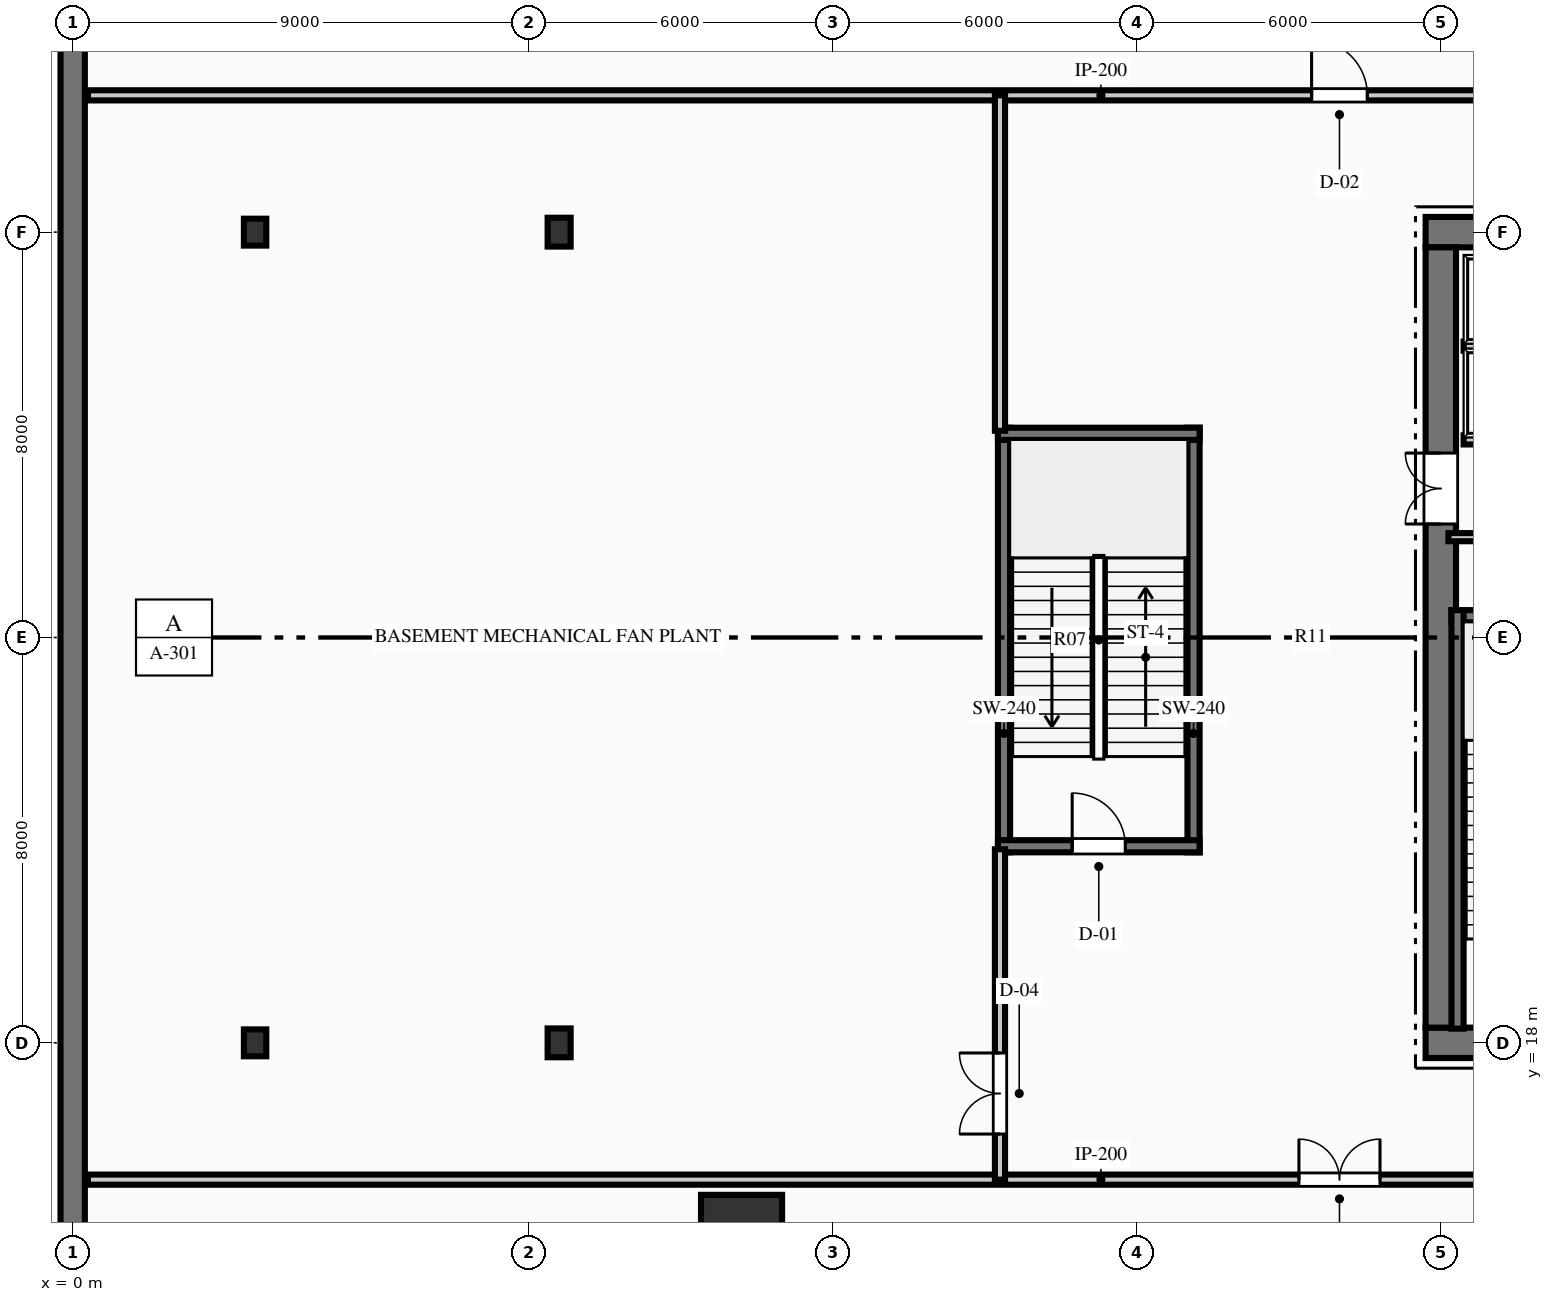
"""IFC4 building model, lengths in metres.
Left out: names, types, materials, properties, quantities, classifications, styles, units other than length and angle.
Written with IfcOpenShell. Run it as: python <this file> out.ifc"""

import sys

from ifc_helpers import new_model, si_unit, direction, frame, frame_2d, origin, origin_2d, place, context, subcontext, project, spatial, rectangle, hollow_rectangle, i_section, extrude, element, fill, save


model = new_model("IFC4")
c1 = context("Model", 3, precision=1e-05, world=origin(), true_north=direction((0.0, 1.0)))
c2 = subcontext(c1, "Body", "Model", "MODEL_VIEW")
j1 = project(units=[si_unit("LENGTHUNIT", "METRE"), si_unit("PLANEANGLEUNIT", "RADIAN")], contexts=[c1])
p1 = place(None, origin())
s1 = spatial("IfcSite", under=j1, at=p1, CompositionType="ELEMENT")
p2 = place(p1, origin())
s2 = spatial("IfcBuilding", under=s1, at=p2, CompositionType="ELEMENT")
p3 = place(p2, frame((0.0, 0.0, -5.2)))
s3 = spatial("IfcBuildingStorey", under=s2, at=p3, CompositionType="ELEMENT", Elevation=-5.2)
p4 = place(p3, frame((26.7, 18.0, -0.3), z_axis=(0.0, 0.0, 1.0), x_axis=(1.0, 0.0, 0.0)))
e1 = element("IfcWall", 1, at=p4, inside=s3, PredefinedType="SHEAR", context=c2, shape_type="SweptSolid", body=[
    extrude(rectangle(XDim=18.6, YDim=0.6, at=frame_2d((9.3, 0.0))), origin(), (0.0, 0.0, 1.0), 5.5),
])
p5 = place(p4, frame((7.4, 0.0, 0.3)))
e2 = element("IfcOpeningElement", 2, at=p5, cuts=e1, PredefinedType="OPENING", context=c2, shape_type="SweptSolid", body=[
    extrude(rectangle(XDim=1.1, YDim=2.15, at=frame_2d((0.55, 1.075))), frame((0.0, 0.31, 0.0), z_axis=(0.0, -1.0, 0.0), x_axis=(1.0, 0.0, 0.0)), (0.0, 0.0, 1.0), 0.62),
])
p6 = place(p4, frame((10.1, 0.0, 0.3)))
e3 = element("IfcOpeningElement", 3, at=p6, cuts=e1, PredefinedType="OPENING", context=c2, shape_type="SweptSolid", body=[
    extrude(rectangle(XDim=1.1, YDim=2.15, at=frame_2d((0.55, 1.075))), frame((0.0, 0.31, 0.0), z_axis=(0.0, -1.0, 0.0), x_axis=(1.0, 0.0, 0.0)), (0.0, 0.0, 1.0), 0.62),
])
p7 = place(p3, frame((26.7, 34.0, -0.3), z_axis=(0.0, 0.0, 1.0), x_axis=(1.0, 0.0, 0.0)))
e4 = element("IfcWall", 4, at=p7, inside=s3, PredefinedType="SHEAR", context=c2, shape_type="SweptSolid", body=[
    extrude(rectangle(XDim=18.6, YDim=0.6, at=frame_2d((9.3, 0.0))), origin(), (0.0, 0.0, 1.0), 5.5),
])
p8 = place(p7, frame((1.265, 0.0, 0.3)))
e5 = element("IfcOpeningElement", 5, at=p8, cuts=e4, PredefinedType="OPENING", context=c2, shape_type="SweptSolid", body=[
    extrude(rectangle(XDim=1.1, YDim=2.15, at=frame_2d((0.55, 1.075))), frame((0.0, 0.31, 0.0), z_axis=(0.0, -1.0, 0.0), x_axis=(1.0, 0.0, 0.0)), (0.0, 0.0, 1.0), 0.62),
])
p9 = place(p7, frame((3.515, 0.0, 0.3)))
e6 = element("IfcOpeningElement", 6, at=p9, cuts=e4, PredefinedType="OPENING", context=c2, shape_type="SweptSolid", body=[
    extrude(rectangle(XDim=1.1, YDim=2.15, at=frame_2d((0.55, 1.075))), frame((0.0, 0.31, 0.0), z_axis=(0.0, -1.0, 0.0), x_axis=(1.0, 0.0, 0.0)), (0.0, 0.0, 1.0), 0.62),
])
p10 = place(p3, frame((27.0, 18.3, -0.3), z_axis=(0.0, 0.0, 1.0), x_axis=(0.0, 1.0, 0.0)))
e7 = element("IfcWall", 7, at=p10, inside=s3, PredefinedType="SHEAR", context=c2, shape_type="SweptSolid", body=[
    extrude(rectangle(XDim=15.4, YDim=0.6, at=frame_2d((7.7, 0.0))), origin(), (0.0, 0.0, 1.0), 5.5),
])
p11 = place(p10, frame((9.94, 0.0, 0.3)))
e8 = element("IfcOpeningElement", 8, at=p11, cuts=e7, PredefinedType="OPENING", context=c2, shape_type="SweptSolid", body=[
    extrude(rectangle(XDim=1.4, YDim=2.2, at=frame_2d((0.7, 1.1))), frame((0.0, 0.31, 0.0), z_axis=(0.0, -1.0, 0.0), x_axis=(1.0, 0.0, 0.0)), (0.0, 0.0, 1.0), 0.62),
])
p12 = place(p3, frame((27.21, 26.42, -0.3), z_axis=(0.0, 0.0, 1.0), x_axis=(1.0, 0.0, 0.0)))
e9 = element("IfcWall", 9, at=p12, inside=s3, PredefinedType="SHEAR", context=c2, shape_type="SweptSolid", body=[
    extrude(rectangle(XDim=3.98, YDim=0.24, at=frame_2d((1.99, 0.0))), origin(), (0.0, 0.0, 1.0), 5.5),
])
p13 = place(p3, frame((27.33, 18.28, -0.3), z_axis=(0.0, 0.0, 1.0), x_axis=(0.0, 1.0, 0.0)))
e10 = element("IfcWall", 10, at=p13, inside=s3, PredefinedType="SHEAR", context=c2, shape_type="SweptSolid", body=[
    extrude(rectangle(XDim=8.26, YDim=0.24, at=frame_2d((4.13, 0.0))), origin(), (0.0, 0.0, 1.0), 5.5),
])
for number, where, z_axis, x_axis in (
    (11, (18.38, 21.76, -0.3), (0.0, 0.0, 1.0), (0.0, 1.0, 0.0)),
    (12, (22.12, 21.76, -0.3), (0.0, 0.0, 1.0), (0.0, 1.0, 0.0)),
):
    element("IfcWall", number, at=place(p3, frame(where, z_axis=z_axis, x_axis=x_axis)), inside=s3, PredefinedType="SHEAR", context=c2, shape_type="SweptSolid", body=[
        extrude(rectangle(XDim=8.38, YDim=0.24, at=frame_2d((4.19, 0.0))), origin(), (0.0, 0.0, 1.0), 5.5),
    ])
p14 = place(p3, frame((18.26, 21.88, -0.3), z_axis=(0.0, 0.0, 1.0), x_axis=(1.0, 0.0, 0.0)))
e13 = element("IfcWall", 13, at=p14, inside=s3, PredefinedType="SHEAR", context=c2, shape_type="SweptSolid", body=[
    extrude(rectangle(XDim=3.98, YDim=0.24, at=frame_2d((1.99, 0.0))), origin(), (0.0, 0.0, 1.0), 5.5),
])
p15 = place(p14, frame((1.465, 0.0, 0.3)))
e14 = element("IfcOpeningElement", 14, at=p15, cuts=e13, PredefinedType="OPENING", context=c2, shape_type="SweptSolid", body=[
    extrude(rectangle(XDim=1.05, YDim=2.15, at=frame_2d((0.525, 1.075))), frame((0.0, 0.13, 0.0), z_axis=(0.0, -1.0, 0.0), x_axis=(1.0, 0.0, 0.0)), (0.0, 0.0, 1.0), 0.26),
])
p16 = place(p3, frame((18.26, 30.02, -0.3), z_axis=(0.0, 0.0, 1.0), x_axis=(1.0, 0.0, 0.0)))
e15 = element("IfcWall", 15, at=p16, inside=s3, PredefinedType="SHEAR", context=c2, shape_type="SweptSolid", body=[
    extrude(rectangle(XDim=3.98, YDim=0.24, at=frame_2d((1.99, 0.0))), origin(), (0.0, 0.0, 1.0), 5.5),
])
p17 = place(p3, frame((0.0, 48.0, -0.3), z_axis=(0.0, 0.0, 1.0), x_axis=(0.0, -1.0, 0.0)))
e16 = element("IfcWall", 16, at=p17, inside=s3, PredefinedType="SHEAR", context=c2, shape_type="SweptSolid", body=[
    extrude(rectangle(XDim=44.0, YDim=0.48, at=frame_2d((22.0, 0.0))), origin(), (0.0, 0.0, 1.0), 5.5),
])
p18 = place(p3, frame((13.2, 14.2, -0.3), z_axis=(0.0, 0.0, 1.0), x_axis=(1.0, 0.0, 0.0)))
e17 = element("IfcColumn", 17, at=p18, inside=s3, PredefinedType="COLUMN", context=c2, shape_type="SweptSolid", body=[
    extrude(hollow_rectangle(XDim=1.6, YDim=1.6, WallThickness=0.08, at=origin_2d()), origin(), (0.0, 0.0, 1.0), 5.5),
])
for number, where, z_axis, x_axis in (
    (18, (9.6, 18.0, -0.3), (0.0, 0.0, 1.0), (1.0, 0.0, 0.0)),
    (19, (9.6, 34.0, -0.3), (0.0, 0.0, 1.0), (1.0, 0.0, 0.0)),
):
    element("IfcColumn", number, at=place(p3, frame(where, z_axis=z_axis, x_axis=x_axis)), inside=s3, PredefinedType="COLUMN", context=c2, shape_type="SweptSolid", body=[
        extrude(i_section(OverallWidth=0.454, OverallDepth=0.569, WebThickness=0.078, FlangeThickness=0.125, at=origin_2d()), origin(), (0.0, 0.0, 1.0), 5.5),
    ])
for number, where, z_axis, x_axis in (
    (20, (3.6, 18.0, -0.3), (0.0, 0.0, 1.0), (1.0, 0.0, 0.0)),
    (21, (3.6, 34.0, -0.3), (0.0, 0.0, 1.0), (1.0, 0.0, 0.0)),
):
    element("IfcColumn", number, at=place(p3, frame(where, z_axis=z_axis, x_axis=x_axis)), inside=s3, PredefinedType="COLUMN", context=c2, shape_type="SweptSolid", body=[
        extrude(i_section(OverallWidth=0.442, OverallDepth=0.531, WebThickness=0.066, FlangeThickness=0.106, at=origin_2d()), origin(), (0.0, 0.0, 1.0), 5.5),
    ])
p19 = place(p3, frame((27.15, 27.98, 0.0), z_axis=(0.0, 0.0, 1.0), x_axis=(1.0, 0.0, 0.0)))
e22 = element("IfcWall", 22, at=p19, inside=s3, PredefinedType="PARTITIONING", context=c2, shape_type="SweptSolid", body=[
    extrude(rectangle(XDim=4.05, YDim=0.16, at=frame_2d((2.025, 0.0))), origin(), (0.0, 0.0, 1.0), 4.84),
])
p20 = place(p19, frame((1.575, 0.0, 0.0)))
e23 = element("IfcOpeningElement", 23, at=p20, cuts=e22, PredefinedType="OPENING", context=c2, shape_type="SweptSolid", body=[
    extrude(rectangle(XDim=0.95, YDim=2.15, at=frame_2d((0.475, 1.075))), frame((0.0, 0.09, 0.0), z_axis=(0.0, -1.0, 0.0), x_axis=(1.0, 0.0, 0.0)), (0.0, 0.0, 1.0), 0.18),
])
p21 = place(p3, frame((27.45, 29.9, 0.0), z_axis=(0.0, 0.0, 1.0), x_axis=(1.0, 0.0, 0.0)))
e24 = element("IfcWall", 24, at=p21, inside=s3, PredefinedType="PARTITIONING", context=c2, shape_type="SweptSolid", body=[
    extrude(rectangle(XDim=4.43, YDim=0.18, at=frame_2d((2.215, 0.0))), origin(), (0.0, 0.0, 1.0), 4.84),
])
p22 = place(p21, frame((0.515, 0.0, 0.0)))
e25 = element("IfcOpeningElement", 25, at=p22, cuts=e24, PredefinedType="OPENING", context=c2, shape_type="SweptSolid", body=[
    extrude(rectangle(XDim=1.1, YDim=2.15, at=frame_2d((0.55, 1.075))), frame((0.0, 0.1, 0.0), z_axis=(0.0, -1.0, 0.0), x_axis=(1.0, 0.0, 0.0)), (0.0, 0.0, 1.0), 0.2),
])
p23 = place(p21, frame((2.765, 0.0, 0.0)))
e26 = element("IfcOpeningElement", 26, at=p23, cuts=e24, PredefinedType="OPENING", context=c2, shape_type="SweptSolid", body=[
    extrude(rectangle(XDim=1.1, YDim=2.15, at=frame_2d((0.55, 1.075))), frame((0.0, 0.1, 0.0), z_axis=(0.0, -1.0, 0.0), x_axis=(1.0, 0.0, 0.0)), (0.0, 0.0, 1.0), 0.2),
])
p24 = place(p3, frame((27.45, 31.75, 0.0), z_axis=(0.0, 0.0, 1.0), x_axis=(1.0, 0.0, 0.0)))
e27 = element("IfcWall", 27, at=p24, inside=s3, PredefinedType="PARTITIONING", context=c2, shape_type="SweptSolid", body=[
    extrude(rectangle(XDim=4.43, YDim=0.18, at=frame_2d((2.215, 0.0))), origin(), (0.0, 0.0, 1.0), 4.84),
])
p25 = place(p3, frame((0.3, 15.3, 0.0), z_axis=(0.0, 0.0, 1.0), x_axis=(1.0, 0.0, 0.0)))
e28 = element("IfcWall", 28, at=p25, inside=s3, PredefinedType="PARTITIONING", context=c2, shape_type="SweptSolid", body=[
    extrude(rectangle(XDim=71.4, YDim=0.2, at=frame_2d((35.7, 0.0))), origin(), (0.0, 0.0, 1.0), 3.935),
])
p26 = place(p25, frame((23.9, 0.0, 0.0)))
e29 = element("IfcOpeningElement", 29, at=p26, cuts=e28, PredefinedType="OPENING", context=c2, shape_type="SweptSolid", body=[
    extrude(rectangle(XDim=1.6, YDim=2.2, at=frame_2d((0.8, 1.1))), frame((0.0, 0.11, 0.0), z_axis=(0.0, -1.0, 0.0), x_axis=(1.0, 0.0, 0.0)), (0.0, 0.0, 1.0), 0.22),
])
p27 = place(p25, frame((45.9, 0.0, 0.0)))
e30 = element("IfcOpeningElement", 30, at=p27, cuts=e28, PredefinedType="OPENING", context=c2, shape_type="SweptSolid", body=[
    extrude(rectangle(XDim=1.6, YDim=2.2, at=frame_2d((0.8, 1.1))), frame((0.0, 0.11, 0.0), z_axis=(0.0, -1.0, 0.0), x_axis=(1.0, 0.0, 0.0)), (0.0, 0.0, 1.0), 0.22),
])
p28 = place(p3, frame((0.3, 36.7, 0.0), z_axis=(0.0, 0.0, 1.0), x_axis=(1.0, 0.0, 0.0)))
e31 = element("IfcWall", 31, at=p28, inside=s3, PredefinedType="PARTITIONING", context=c2, shape_type="SweptSolid", body=[
    extrude(rectangle(XDim=71.4, YDim=0.2, at=frame_2d((35.7, 0.0))), origin(), (0.0, 0.0, 1.0), 4.84),
])
p29 = place(p28, frame((24.15, 0.0, 0.0)))
e32 = element("IfcOpeningElement", 32, at=p29, cuts=e31, PredefinedType="OPENING", context=c2, shape_type="SweptSolid", body=[
    extrude(rectangle(XDim=1.1, YDim=2.15, at=frame_2d((0.55, 1.075))), frame((0.0, 0.11, 0.0), z_axis=(0.0, -1.0, 0.0), x_axis=(1.0, 0.0, 0.0)), (0.0, 0.0, 1.0), 0.22),
])
p30 = place(p28, frame((36.95, 0.0, 0.0)))
e33 = element("IfcOpeningElement", 33, at=p30, cuts=e31, PredefinedType="OPENING", context=c2, shape_type="SweptSolid", body=[
    extrude(rectangle(XDim=0.9, YDim=2.15, at=frame_2d((0.45, 1.075))), frame((0.0, 0.11, 0.0), z_axis=(0.0, -1.0, 0.0), x_axis=(1.0, 0.0, 0.0)), (0.0, 0.0, 1.0), 0.22),
])
p31 = place(p28, frame((40.06, 0.0, 0.0)))
e34 = element("IfcOpeningElement", 34, at=p31, cuts=e31, PredefinedType="OPENING", context=c2, shape_type="SweptSolid", body=[
    extrude(rectangle(XDim=1.0, YDim=2.15, at=frame_2d((0.5, 1.075))), frame((0.0, 0.11, 0.0), z_axis=(0.0, -1.0, 0.0), x_axis=(1.0, 0.0, 0.0)), (0.0, 0.0, 1.0), 0.22),
])
p32 = place(p28, frame((47.15, 0.0, 0.0)))
e35 = element("IfcOpeningElement", 35, at=p32, cuts=e31, PredefinedType="OPENING", context=c2, shape_type="SweptSolid", body=[
    extrude(rectangle(XDim=1.1, YDim=2.15, at=frame_2d((0.55, 1.075))), frame((0.0, 0.11, 0.0), z_axis=(0.0, -1.0, 0.0), x_axis=(1.0, 0.0, 0.0)), (0.0, 0.0, 1.0), 0.22),
])
p33 = place(p3, frame((18.3, 15.3, 0.0), z_axis=(0.0, 0.0, 1.0), x_axis=(0.0, 1.0, 0.0)))
e36 = element("IfcWall", 36, at=p33, inside=s3, PredefinedType="PARTITIONING", context=c2, shape_type="SweptSolid", body=[
    extrude(rectangle(XDim=6.52, YDim=0.2, at=frame_2d((3.26, 0.0))), origin(), (0.0, 0.0, 1.0), 4.84),
])
p34 = place(p33, frame((0.9, 0.0, 0.0)))
e37 = element("IfcOpeningElement", 37, at=p34, cuts=e36, PredefinedType="OPENING", context=c2, shape_type="SweptSolid", body=[
    extrude(rectangle(XDim=1.6, YDim=2.2, at=frame_2d((0.8, 1.1))), frame((0.0, 0.11, 0.0), z_axis=(0.0, -1.0, 0.0), x_axis=(1.0, 0.0, 0.0)), (0.0, 0.0, 1.0), 0.22),
])
p35 = place(p3, frame((18.3, 30.08, 0.0), z_axis=(0.0, 0.0, 1.0), x_axis=(0.0, 1.0, 0.0)))
e38 = element("IfcWall", 38, at=p35, inside=s3, PredefinedType="PARTITIONING", context=c2, shape_type="SweptSolid", body=[
    extrude(rectangle(XDim=6.62, YDim=0.2, at=frame_2d((3.31, 0.0))), origin(), (0.0, 0.0, 1.0), 4.84),
])
p36 = place(p11, origin())
e39 = element("IfcDoor", 39, at=p36, inside=s3, OperationType="DOUBLE_DOOR_SINGLE_SWING", PredefinedType="DOOR", context=c2, shape_type="SweptSolid", body=[
    extrude(rectangle(XDim=1.4, YDim=2.2, at=frame_2d((0.7, 1.1))), frame((0.0, 0.025, 0.0), z_axis=(0.0, -1.0, 0.0), x_axis=(1.0, 0.0, 0.0)), (0.0, 0.0, 1.0), 0.05),
])
fill(e8, e39)
p37 = place(p15, origin())
e40 = element("IfcDoor", 40, at=p37, inside=s3, OperationType="SINGLE_SWING_LEFT", PredefinedType="DOOR", context=c2, shape_type="SweptSolid", body=[
    extrude(rectangle(XDim=1.05, YDim=2.15, at=frame_2d((0.525, 1.075))), frame((0.0, 0.025, 0.0), z_axis=(0.0, -1.0, 0.0), x_axis=(1.0, 0.0, 0.0)), (0.0, 0.0, 1.0), 0.05),
])
fill(e14, e40)
p38 = place(p26, origin())
e41 = element("IfcDoor", 41, at=p38, inside=s3, OperationType="DOUBLE_DOOR_SINGLE_SWING", PredefinedType="DOOR", context=c2, shape_type="SweptSolid", body=[
    extrude(rectangle(XDim=1.6, YDim=2.2, at=frame_2d((0.8, 1.1))), frame((0.0, 0.025, 0.0), z_axis=(0.0, -1.0, 0.0), x_axis=(1.0, 0.0, 0.0)), (0.0, 0.0, 1.0), 0.05),
])
fill(e29, e41)
p39 = place(p29, origin())
e42 = element("IfcDoor", 42, at=p39, inside=s3, OperationType="SINGLE_SWING_LEFT", PredefinedType="DOOR", context=c2, shape_type="SweptSolid", body=[
    extrude(rectangle(XDim=1.1, YDim=2.15, at=frame_2d((0.55, 1.075))), frame((0.0, 0.025, 0.0), z_axis=(0.0, -1.0, 0.0), x_axis=(1.0, 0.0, 0.0)), (0.0, 0.0, 1.0), 0.05),
])
fill(e32, e42)
p40 = place(p34, origin())
e43 = element("IfcDoor", 43, at=p40, inside=s3, OperationType="DOUBLE_DOOR_SINGLE_SWING", PredefinedType="DOOR", context=c2, shape_type="SweptSolid", body=[
    extrude(rectangle(XDim=1.6, YDim=2.2, at=frame_2d((0.8, 1.1))), frame((0.0, 0.025, 0.0), z_axis=(0.0, -1.0, 0.0), x_axis=(1.0, 0.0, 0.0)), (0.0, 0.0, 1.0), 0.05),
])
fill(e37, e43)
save(model, sys.argv[1])
